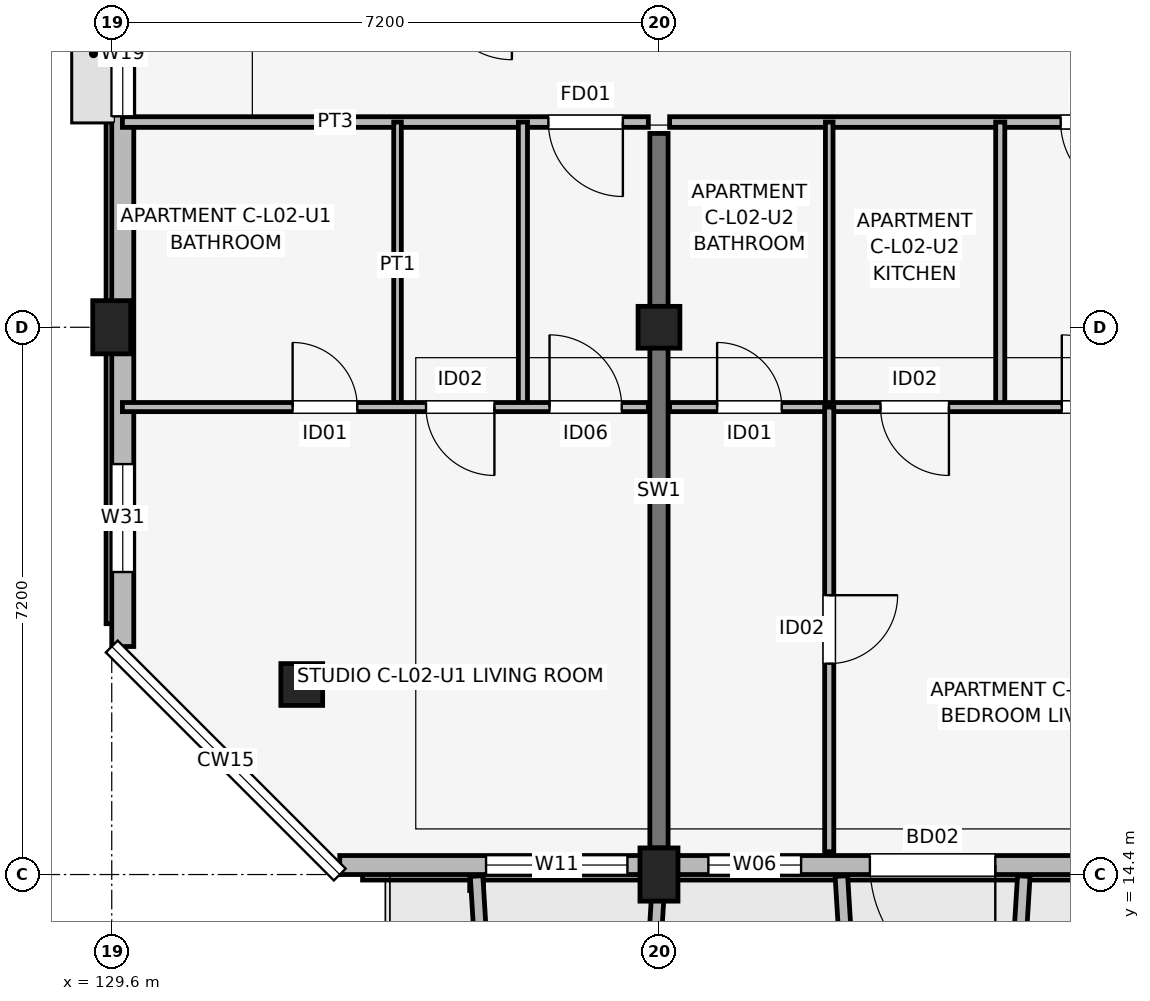
"""IFC4 building model, lengths in metres.
Left out: names, types, materials, properties, quantities, classifications, styles, units other than length and angle.
Written with IfcOpenShell. Run it as: python <this file> out.ifc"""

import sys

from ifc_helpers import new_model, si_unit, direction, frame, frame_2d, origin, origin_2d, place, context, subcontext, project, spatial, rectangle, extrude, element, fill, save


model = new_model("IFC4")
c1 = context("Model", 3, precision=1e-05, world=origin(), true_north=direction((0.0, 1.0)))
c2 = subcontext(c1, "Body", "Model", "MODEL_VIEW")
j1 = project(units=[si_unit("LENGTHUNIT", "METRE"), si_unit("PLANEANGLEUNIT", "RADIAN")], contexts=[c1])
p1 = place(None, origin())
s1 = spatial("IfcSite", under=j1, at=p1, CompositionType="ELEMENT")
p2 = place(p1, origin())
s2 = spatial("IfcBuilding", under=s1, at=p2, CompositionType="ELEMENT")
p3 = place(p2, frame((0.0, 0.0, 8.7)))
s3 = spatial("IfcBuildingStorey", under=s2, at=p3, CompositionType="ELEMENT", Elevation=8.7)
p4 = place(p3, frame((132.1, 16.9, 0.0), z_axis=(0.0, 0.0, 1.0), x_axis=(1.0, 0.0, 0.0)))
e1 = element("IfcColumn", 1, at=p4, inside=s3, PredefinedType="COLUMN", context=c2, shape_type="SweptSolid", body=[
    extrude(rectangle(XDim=0.55, YDim=0.55, at=origin_2d()), origin(), (0.0, 0.0, 1.0), 3.15),
])
for number, where, z_axis, x_axis in (
    (2, (129.6, 21.6, 0.0), (0.0, 0.0, 1.0), (1.0, 0.0, 0.0)),
    (3, (136.8, 14.4, 0.0), (0.0, 0.0, 1.0), (1.0, 0.0, 0.0)),
):
    element("IfcColumn", number, at=place(p3, frame(where, z_axis=z_axis, x_axis=x_axis)), inside=s3, PredefinedType="COLUMN", context=c2, shape_type="SweptSolid", body=[
        extrude(rectangle(XDim=0.5, YDim=0.7, at=origin_2d()), origin(), (0.0, 0.0, 1.0), 3.15),
    ])
p5 = place(p3, frame((136.8, 21.6, 0.0), z_axis=(0.0, 0.0, 1.0), x_axis=(1.0, 0.0, 0.0)))
e4 = element("IfcColumn", 4, at=p5, inside=s3, PredefinedType="COLUMN", context=c2, shape_type="SweptSolid", body=[
    extrude(rectangle(XDim=0.55, YDim=0.55, at=origin_2d()), origin(), (0.0, 0.0, 1.0), 3.15),
])
p6 = place(p3, frame((136.8, 14.75, 0.0), z_axis=(0.0, 0.0, 1.0), x_axis=(0.0, 1.0, 0.0)))
e5 = element("IfcWall", 5, at=p6, inside=s3, PredefinedType="SHEAR", context=c2, shape_type="SweptSolid", body=[
    extrude(rectangle(XDim=9.4, YDim=0.24, at=frame_2d((4.7, 0.0))), origin(), (0.0, 0.0, 1.0), 3.15),
])
p7 = place(p3, frame((132.6, 14.525, 0.0), z_axis=(0.0, 0.0, 1.0), x_axis=(1.0, 0.0, 0.0)))
e6 = element("IfcWall", 6, at=p7, inside=s3, PredefinedType="SOLIDWALL", context=c2, shape_type="SweptSolid", body=[
    extrude(rectangle(XDim=30.0, YDim=0.25, at=frame_2d((15.0, 0.0))), origin(), (0.0, 0.0, 1.0), 2.43),
])
p8 = place(p7, frame((8.625, 0.0, 0.0), z_axis=(0.0, 0.0, 1.0), x_axis=(-1.0, 0.0, 0.0)))
e7 = element("IfcOpeningElement", 7, at=p8, cuts=e6, PredefinedType="OPENING", context=c2, shape_type="SweptSolid", body=[
    extrude(rectangle(XDim=1.65, YDim=2.15, at=frame_2d((0.825, 1.075))), frame((0.0, 0.135, 0.0), z_axis=(0.0, -1.0, 0.0), x_axis=(1.0, 0.0, 0.0)), (0.0, 0.0, 1.0), 0.27),
])
p9 = place(p7, frame((22.95, 0.0, 0.0), z_axis=(0.0, 0.0, 1.0), x_axis=(-1.0, 0.0, 0.0)))
e8 = element("IfcOpeningElement", 8, at=p9, cuts=e6, PredefinedType="OPENING", context=c2, shape_type="SweptSolid", body=[
    extrude(rectangle(XDim=1.5, YDim=2.15, at=frame_2d((0.75, 1.075))), frame((0.0, 0.135, 0.0), z_axis=(0.0, -1.0, 0.0), x_axis=(1.0, 0.0, 0.0)), (0.0, 0.0, 1.0), 0.27),
])
p10 = place(p7, frame((1.925, 0.0, 0.7)))
e9 = element("IfcOpeningElement", 9, at=p10, cuts=e6, PredefinedType="OPENING", context=c2, shape_type="SweptSolid", body=[
    extrude(rectangle(XDim=1.86, YDim=1.6, at=frame_2d((0.93, 0.8))), frame((0.0, 0.135, 0.0), z_axis=(0.0, -1.0, 0.0), x_axis=(1.0, 0.0, 0.0)), (0.0, 0.0, 1.0), 0.27),
])
p11 = place(p7, frame((4.85, 0.0, 0.75)))
e10 = element("IfcOpeningElement", 10, at=p11, cuts=e6, PredefinedType="OPENING", context=c2, shape_type="SweptSolid", body=[
    extrude(rectangle(XDim=1.22, YDim=1.5, at=frame_2d((0.61, 0.75))), frame((0.0, 0.135, 0.0), z_axis=(0.0, -1.0, 0.0), x_axis=(1.0, 0.0, 0.0)), (0.0, 0.0, 1.0), 0.27),
])
p12 = place(p7, frame((13.925, 0.0, 0.67)))
e11 = element("IfcOpeningElement", 11, at=p12, cuts=e6, PredefinedType="OPENING", context=c2, shape_type="SweptSolid", body=[
    extrude(rectangle(XDim=2.15, YDim=1.65, at=frame_2d((1.075, 0.825))), frame((0.0, 0.135, 0.0), z_axis=(0.0, -1.0, 0.0), x_axis=(1.0, 0.0, 0.0)), (0.0, 0.0, 1.0), 0.27),
])
p13 = place(p7, frame((26.265, 0.0, 0.75)))
e12 = element("IfcOpeningElement", 12, at=p13, cuts=e6, PredefinedType="OPENING", context=c2, shape_type="SweptSolid", body=[
    extrude(rectangle(XDim=1.34, YDim=1.55, at=frame_2d((0.67, 0.775))), frame((0.0, 0.135, 0.0), z_axis=(0.0, -1.0, 0.0), x_axis=(1.0, 0.0, 0.0)), (0.0, 0.0, 1.0), 0.27),
])
p14 = place(p7, frame((28.715, 0.0, 0.75)))
e13 = element("IfcOpeningElement", 13, at=p14, cuts=e6, PredefinedType="OPENING", context=c2, shape_type="SweptSolid", body=[
    extrude(rectangle(XDim=0.6, YDim=1.25, at=frame_2d((0.3, 0.625))), frame((0.0, 0.135, 0.0), z_axis=(0.0, -1.0, 0.0), x_axis=(1.0, 0.0, 0.0)), (0.0, 0.0, 1.0), 0.27),
])
p15 = place(p3, frame((129.745, 33.0, 0.0), z_axis=(0.0, 0.0, 1.0), x_axis=(0.0, -1.0, 0.0)))
e14 = element("IfcWall", 14, at=p15, inside=s3, PredefinedType="SOLIDWALL", context=c2, shape_type="SweptSolid", body=[
    extrude(rectangle(XDim=15.6, YDim=0.29, at=frame_2d((7.8, 0.0))), origin(), (0.0, 0.0, 1.0), 2.38),
])
p16 = place(p15, frame((6.975, 0.0, 1.05)))
e15 = element("IfcOpeningElement", 15, at=p16, cuts=e14, PredefinedType="OPENING", context=c2, shape_type="SweptSolid", body=[
    extrude(rectangle(XDim=1.65, YDim=1.15, at=frame_2d((0.825, 0.575))), frame((0.0, 0.155, 0.0), z_axis=(0.0, -1.0, 0.0), x_axis=(1.0, 0.0, 0.0)), (0.0, 0.0, 1.0), 0.31),
])
p17 = place(p15, frame((13.2, 0.0, 0.67)))
e16 = element("IfcOpeningElement", 16, at=p17, cuts=e14, PredefinedType="OPENING", context=c2, shape_type="SweptSolid", body=[
    extrude(rectangle(XDim=1.42, YDim=1.6, at=frame_2d((0.71, 0.8))), frame((0.0, 0.155, 0.0), z_axis=(0.0, -1.0, 0.0), x_axis=(1.0, 0.0, 0.0)), (0.0, 0.0, 1.0), 0.31),
])
for number, where, z_axis, x_axis in (
    (17, (134.4, 14.38, 0.0), (0.0, 0.0, 1.0), (0.061, -0.998, 0.0)),
    (18, (136.8, 14.38, 0.0), (0.0, 0.0, 1.0), (-0.061, -0.998, 0.0)),
):
    element("IfcWall", number, at=place(p3, frame(where, z_axis=z_axis, x_axis=x_axis)), inside=s3, PredefinedType="ELEMENTEDWALL", context=c2, shape_type="SweptSolid", body=[
        extrude(rectangle(XDim=1.964, YDim=0.165, at=frame_2d((0.982, 0.0))), origin(), (0.0, 0.0, 1.0), 2.95),
    ])
for number, where, z_axis, x_axis in (
    (19, (139.2, 14.38, 0.0), (0.0, 0.0, 1.0), (0.061, -0.998, 0.0)),
    (20, (141.6, 14.38, 0.0), (0.0, 0.0, 1.0), (-0.061, -0.998, 0.0)),
):
    element("IfcWall", number, at=place(p3, frame(where, z_axis=z_axis, x_axis=x_axis)), inside=s3, PredefinedType="ELEMENTEDWALL", context=c2, shape_type="SweptSolid", body=[
        extrude(rectangle(XDim=1.964, YDim=0.165, at=frame_2d((0.982, 0.0))), origin(), (0.0, 0.0, 1.0), 2.53),
    ])
p18 = place(p3, frame((129.74, 24.3, 0.0), z_axis=(0.0, 0.0, 1.0), x_axis=(1.0, 0.0, 0.0)))
e21 = element("IfcWall", 21, at=p18, inside=s3, PredefinedType="PARTITIONING", context=c2, shape_type="SweptSolid", body=[
    extrude(rectangle(XDim=6.92, YDim=0.14, at=frame_2d((3.46, 0.0))), origin(), (0.0, 0.0, 1.0), 2.38),
])
p19 = place(p18, frame((6.585, 0.0, 0.0), z_axis=(0.0, 0.0, 1.0), x_axis=(-1.0, 0.0, 0.0)))
e22 = element("IfcOpeningElement", 22, at=p19, cuts=e21, PredefinedType="OPENING", context=c2, shape_type="SweptSolid", body=[
    extrude(rectangle(XDim=0.98, YDim=2.1, at=frame_2d((0.49, 1.05))), frame((0.0, 0.08, 0.0), z_axis=(0.0, -1.0, 0.0), x_axis=(1.0, 0.0, 0.0)), (0.0, 0.0, 1.0), 0.16),
])
p20 = place(p3, frame((133.36, 20.55, 0.0), z_axis=(0.0, 0.0, 1.0), x_axis=(0.0, 1.0, 0.0)))
e23 = element("IfcWall", 23, at=p20, inside=s3, PredefinedType="PARTITIONING", context=c2, shape_type="SweptSolid", body=[
    extrude(rectangle(XDim=3.75, YDim=0.1, at=frame_2d((1.875, 0.0))), origin(), (0.0, 0.0, 1.0), 2.375),
])
p21 = place(p3, frame((135.01, 20.55, 0.0), z_axis=(0.0, 0.0, 1.0), x_axis=(0.0, 1.0, 0.0)))
e24 = element("IfcWall", 24, at=p21, inside=s3, PredefinedType="PARTITIONING", context=c2, shape_type="SweptSolid", body=[
    extrude(rectangle(XDim=3.75, YDim=0.12, at=frame_2d((1.875, 0.0))), origin(), (0.0, 0.0, 1.0), 2.375),
])
p22 = place(p3, frame((129.74, 20.55, 0.0), z_axis=(0.0, 0.0, 1.0), x_axis=(1.0, 0.0, 0.0)))
e25 = element("IfcWall", 25, at=p22, inside=s3, PredefinedType="PARTITIONING", context=c2, shape_type="SweptSolid", body=[
    extrude(rectangle(XDim=6.92, YDim=0.12, at=frame_2d((3.46, 0.0))), origin(), (0.0, 0.0, 1.0), 2.38),
])
p23 = place(p22, frame((2.24, 0.0, 0.0)))
e26 = element("IfcOpeningElement", 26, at=p23, cuts=e25, PredefinedType="OPENING", context=c2, shape_type="SweptSolid", body=[
    extrude(rectangle(XDim=0.85, YDim=2.08, at=frame_2d((0.425, 1.04))), frame((0.0, 0.07, 0.0), z_axis=(0.0, -1.0, 0.0), x_axis=(1.0, 0.0, 0.0)), (0.0, 0.0, 1.0), 0.14),
])
p24 = place(p22, frame((4.895, 0.0, 0.0), z_axis=(0.0, 0.0, 1.0), x_axis=(-1.0, 0.0, 0.0)))
e27 = element("IfcOpeningElement", 27, at=p24, cuts=e25, PredefinedType="OPENING", context=c2, shape_type="SweptSolid", body=[
    extrude(rectangle(XDim=0.9, YDim=2.08, at=frame_2d((0.45, 1.04))), frame((0.0, 0.07, 0.0), z_axis=(0.0, -1.0, 0.0), x_axis=(1.0, 0.0, 0.0)), (0.0, 0.0, 1.0), 0.14),
])
p25 = place(p22, frame((5.62, 0.0, 0.0)))
e28 = element("IfcOpeningElement", 28, at=p25, cuts=e25, PredefinedType="OPENING", context=c2, shape_type="SweptSolid", body=[
    extrude(rectangle(XDim=0.95, YDim=2.08, at=frame_2d((0.475, 1.04))), frame((0.0, 0.07, 0.0), z_axis=(0.0, -1.0, 0.0), x_axis=(1.0, 0.0, 0.0)), (0.0, 0.0, 1.0), 0.14),
])
p26 = place(p3, frame((136.94, 24.3, 0.0), z_axis=(0.0, 0.0, 1.0), x_axis=(1.0, 0.0, 0.0)))
e29 = element("IfcWall", 29, at=p26, inside=s3, PredefinedType="PARTITIONING", context=c2, shape_type="SweptSolid", body=[
    extrude(rectangle(XDim=6.92, YDim=0.14, at=frame_2d((3.46, 0.0))), origin(), (0.0, 0.0, 1.0), 2.38),
])
p27 = place(p26, frame((6.125, 0.0, 0.0), z_axis=(0.0, 0.0, 1.0), x_axis=(-1.0, 0.0, 0.0)))
e30 = element("IfcOpeningElement", 30, at=p27, cuts=e29, PredefinedType="OPENING", context=c2, shape_type="SweptSolid", body=[
    extrude(rectangle(XDim=0.98, YDim=2.1, at=frame_2d((0.49, 1.05))), frame((0.0, 0.08, 0.0), z_axis=(0.0, -1.0, 0.0), x_axis=(1.0, 0.0, 0.0)), (0.0, 0.0, 1.0), 0.16),
])
p28 = place(p3, frame((139.04, 20.55, 0.0), z_axis=(0.0, 0.0, 1.0), x_axis=(0.0, 1.0, 0.0)))
e31 = element("IfcWall", 31, at=p28, inside=s3, PredefinedType="PARTITIONING", context=c2, shape_type="SweptSolid", body=[
    extrude(rectangle(XDim=3.75, YDim=0.1, at=frame_2d((1.875, 0.0))), origin(), (0.0, 0.0, 1.0), 2.375),
])
p29 = place(p3, frame((141.29, 20.55, 0.0), z_axis=(0.0, 0.0, 1.0), x_axis=(0.0, 1.0, 0.0)))
e32 = element("IfcWall", 32, at=p29, inside=s3, PredefinedType="PARTITIONING", context=c2, shape_type="SweptSolid", body=[
    extrude(rectangle(XDim=3.75, YDim=0.12, at=frame_2d((1.875, 0.0))), origin(), (0.0, 0.0, 1.0), 2.375),
])
p30 = place(p3, frame((136.94, 20.55, 0.0), z_axis=(0.0, 0.0, 1.0), x_axis=(1.0, 0.0, 0.0)))
e33 = element("IfcWall", 33, at=p30, inside=s3, PredefinedType="PARTITIONING", context=c2, shape_type="SweptSolid", body=[
    extrude(rectangle(XDim=6.92, YDim=0.12, at=frame_2d((3.46, 0.0))), origin(), (0.0, 0.0, 1.0), 2.38),
])
p31 = place(p30, frame((0.625, 0.0, 0.0)))
e34 = element("IfcOpeningElement", 34, at=p31, cuts=e33, PredefinedType="OPENING", context=c2, shape_type="SweptSolid", body=[
    extrude(rectangle(XDim=0.85, YDim=2.08, at=frame_2d((0.425, 1.04))), frame((0.0, 0.07, 0.0), z_axis=(0.0, -1.0, 0.0), x_axis=(1.0, 0.0, 0.0)), (0.0, 0.0, 1.0), 0.14),
])
p32 = place(p30, frame((3.675, 0.0, 0.0), z_axis=(0.0, 0.0, 1.0), x_axis=(-1.0, 0.0, 0.0)))
e35 = element("IfcOpeningElement", 35, at=p32, cuts=e33, PredefinedType="OPENING", context=c2, shape_type="SweptSolid", body=[
    extrude(rectangle(XDim=0.9, YDim=2.08, at=frame_2d((0.45, 1.04))), frame((0.0, 0.07, 0.0), z_axis=(0.0, -1.0, 0.0), x_axis=(1.0, 0.0, 0.0)), (0.0, 0.0, 1.0), 0.14),
])
p33 = place(p30, frame((5.16, 0.0, 0.0)))
e36 = element("IfcOpeningElement", 36, at=p33, cuts=e33, PredefinedType="OPENING", context=c2, shape_type="SweptSolid", body=[
    extrude(rectangle(XDim=0.95, YDim=2.08, at=frame_2d((0.475, 1.04))), frame((0.0, 0.07, 0.0), z_axis=(0.0, -1.0, 0.0), x_axis=(1.0, 0.0, 0.0)), (0.0, 0.0, 1.0), 0.14),
])
p34 = place(p3, frame((139.04, 14.7, 0.0), z_axis=(0.0, 0.0, 1.0), x_axis=(0.0, 1.0, 0.0)))
e37 = element("IfcWall", 37, at=p34, inside=s3, PredefinedType="PARTITIONING", context=c2, shape_type="SweptSolid", body=[
    extrude(rectangle(XDim=5.85, YDim=0.12, at=frame_2d((2.925, 0.0))), origin(), (0.0, 0.0, 1.0), 2.38),
])
p35 = place(p34, frame((3.375, 0.0, 0.0), z_axis=(0.0, 0.0, 1.0), x_axis=(-1.0, 0.0, 0.0)))
e38 = element("IfcOpeningElement", 38, at=p35, cuts=e37, PredefinedType="OPENING", context=c2, shape_type="SweptSolid", body=[
    extrude(rectangle(XDim=0.9, YDim=2.08, at=frame_2d((0.45, 1.04))), frame((0.0, 0.07, 0.0), z_axis=(0.0, -1.0, 0.0), x_axis=(1.0, 0.0, 0.0)), (0.0, 0.0, 1.0), 0.14),
])
p36 = place(p8, origin())
e39 = element("IfcDoor", 39, at=p36, inside=s3, OperationType="SINGLE_SWING_RIGHT", PredefinedType="DOOR", context=c2, shape_type="SweptSolid", body=[
    extrude(rectangle(XDim=1.65, YDim=2.15, at=frame_2d((0.825, 1.075))), frame((0.0, 0.025, 0.0), z_axis=(0.0, -1.0, 0.0), x_axis=(1.0, 0.0, 0.0)), (0.0, 0.0, 1.0), 0.05),
])
fill(e7, e39)
p37 = place(p10, origin())
e40 = element("IfcWindow", 40, at=p37, inside=s3, PartitioningType="SINGLE_PANEL", PredefinedType="WINDOW", context=c2, shape_type="SweptSolid", body=[
    extrude(rectangle(XDim=1.86, YDim=1.6, at=frame_2d((0.93, 0.8))), frame((0.0, 0.03, 0.0), z_axis=(0.0, -1.0, 0.0), x_axis=(1.0, 0.0, 0.0)), (0.0, 0.0, 1.0), 0.06),
])
fill(e9, e40)
p38 = place(p11, origin())
e41 = element("IfcWindow", 41, at=p38, inside=s3, PartitioningType="SINGLE_PANEL", PredefinedType="WINDOW", context=c2, shape_type="SweptSolid", body=[
    extrude(rectangle(XDim=1.22, YDim=1.5, at=frame_2d((0.61, 0.75))), frame((0.0, 0.03, 0.0), z_axis=(0.0, -1.0, 0.0), x_axis=(1.0, 0.0, 0.0)), (0.0, 0.0, 1.0), 0.06),
])
fill(e10, e41)
p39 = place(p16, origin())
e42 = element("IfcWindow", 42, at=p39, inside=s3, PartitioningType="SINGLE_PANEL", PredefinedType="WINDOW", context=c2, shape_type="SweptSolid", body=[
    extrude(rectangle(XDim=1.65, YDim=1.15, at=frame_2d((0.825, 0.575))), frame((0.0, 0.03, 0.0), z_axis=(0.0, -1.0, 0.0), x_axis=(1.0, 0.0, 0.0)), (0.0, 0.0, 1.0), 0.06),
])
fill(e15, e42)
p40 = place(p17, origin())
e43 = element("IfcWindow", 43, at=p40, inside=s3, PartitioningType="SINGLE_PANEL", PredefinedType="WINDOW", context=c2, shape_type="SweptSolid", body=[
    extrude(rectangle(XDim=1.42, YDim=1.6, at=frame_2d((0.71, 0.8))), frame((0.0, 0.03, 0.0), z_axis=(0.0, -1.0, 0.0), x_axis=(1.0, 0.0, 0.0)), (0.0, 0.0, 1.0), 0.06),
])
fill(e16, e43)
p41 = place(p19, origin())
e44 = element("IfcDoor", 44, at=p41, inside=s3, OperationType="SINGLE_SWING_RIGHT", PredefinedType="DOOR", context=c2, shape_type="SweptSolid", body=[
    extrude(rectangle(XDim=0.98, YDim=2.1, at=frame_2d((0.49, 1.05))), frame((0.0, 0.025, 0.0), z_axis=(0.0, -1.0, 0.0), x_axis=(1.0, 0.0, 0.0)), (0.0, 0.0, 1.0), 0.05),
])
fill(e22, e44)
p42 = place(p23, origin())
e45 = element("IfcDoor", 45, at=p42, inside=s3, OperationType="SINGLE_SWING_LEFT", PredefinedType="DOOR", context=c2, shape_type="SweptSolid", body=[
    extrude(rectangle(XDim=0.85, YDim=2.08, at=frame_2d((0.425, 1.04))), frame((0.0, 0.025, 0.0), z_axis=(0.0, -1.0, 0.0), x_axis=(1.0, 0.0, 0.0)), (0.0, 0.0, 1.0), 0.05),
])
fill(e26, e45)
p43 = place(p24, origin())
e46 = element("IfcDoor", 46, at=p43, inside=s3, OperationType="SINGLE_SWING_RIGHT", PredefinedType="DOOR", context=c2, shape_type="SweptSolid", body=[
    extrude(rectangle(XDim=0.9, YDim=2.08, at=frame_2d((0.45, 1.04))), frame((0.0, 0.025, 0.0), z_axis=(0.0, -1.0, 0.0), x_axis=(1.0, 0.0, 0.0)), (0.0, 0.0, 1.0), 0.05),
])
fill(e27, e46)
p44 = place(p25, origin())
e47 = element("IfcDoor", 47, at=p44, inside=s3, OperationType="SINGLE_SWING_LEFT", PredefinedType="DOOR", context=c2, shape_type="SweptSolid", body=[
    extrude(rectangle(XDim=0.95, YDim=2.08, at=frame_2d((0.475, 1.04))), frame((0.0, 0.025, 0.0), z_axis=(0.0, -1.0, 0.0), x_axis=(1.0, 0.0, 0.0)), (0.0, 0.0, 1.0), 0.05),
])
fill(e28, e47)
p45 = place(p27, origin())
e48 = element("IfcDoor", 48, at=p45, inside=s3, OperationType="SINGLE_SWING_RIGHT", PredefinedType="DOOR", context=c2, shape_type="SweptSolid", body=[
    extrude(rectangle(XDim=0.98, YDim=2.1, at=frame_2d((0.49, 1.05))), frame((0.0, 0.025, 0.0), z_axis=(0.0, -1.0, 0.0), x_axis=(1.0, 0.0, 0.0)), (0.0, 0.0, 1.0), 0.05),
])
fill(e30, e48)
p46 = place(p31, origin())
e49 = element("IfcDoor", 49, at=p46, inside=s3, OperationType="SINGLE_SWING_LEFT", PredefinedType="DOOR", context=c2, shape_type="SweptSolid", body=[
    extrude(rectangle(XDim=0.85, YDim=2.08, at=frame_2d((0.425, 1.04))), frame((0.0, 0.025, 0.0), z_axis=(0.0, -1.0, 0.0), x_axis=(1.0, 0.0, 0.0)), (0.0, 0.0, 1.0), 0.05),
])
fill(e34, e49)
p47 = place(p32, origin())
e50 = element("IfcDoor", 50, at=p47, inside=s3, OperationType="SINGLE_SWING_RIGHT", PredefinedType="DOOR", context=c2, shape_type="SweptSolid", body=[
    extrude(rectangle(XDim=0.9, YDim=2.08, at=frame_2d((0.45, 1.04))), frame((0.0, 0.025, 0.0), z_axis=(0.0, -1.0, 0.0), x_axis=(1.0, 0.0, 0.0)), (0.0, 0.0, 1.0), 0.05),
])
fill(e35, e50)
p48 = place(p33, origin())
e51 = element("IfcDoor", 51, at=p48, inside=s3, OperationType="SINGLE_SWING_LEFT", PredefinedType="DOOR", context=c2, shape_type="SweptSolid", body=[
    extrude(rectangle(XDim=0.95, YDim=2.08, at=frame_2d((0.475, 1.04))), frame((0.0, 0.025, 0.0), z_axis=(0.0, -1.0, 0.0), x_axis=(1.0, 0.0, 0.0)), (0.0, 0.0, 1.0), 0.05),
])
fill(e36, e51)
p49 = place(p35, origin())
e52 = element("IfcDoor", 52, at=p49, inside=s3, OperationType="SINGLE_SWING_RIGHT", PredefinedType="DOOR", context=c2, shape_type="SweptSolid", body=[
    extrude(rectangle(XDim=0.9, YDim=2.08, at=frame_2d((0.45, 1.04))), frame((0.0, 0.025, 0.0), z_axis=(0.0, -1.0, 0.0), x_axis=(1.0, 0.0, 0.0)), (0.0, 0.0, 1.0), 0.05),
])
fill(e38, e52)
save(model, sys.argv[1])
